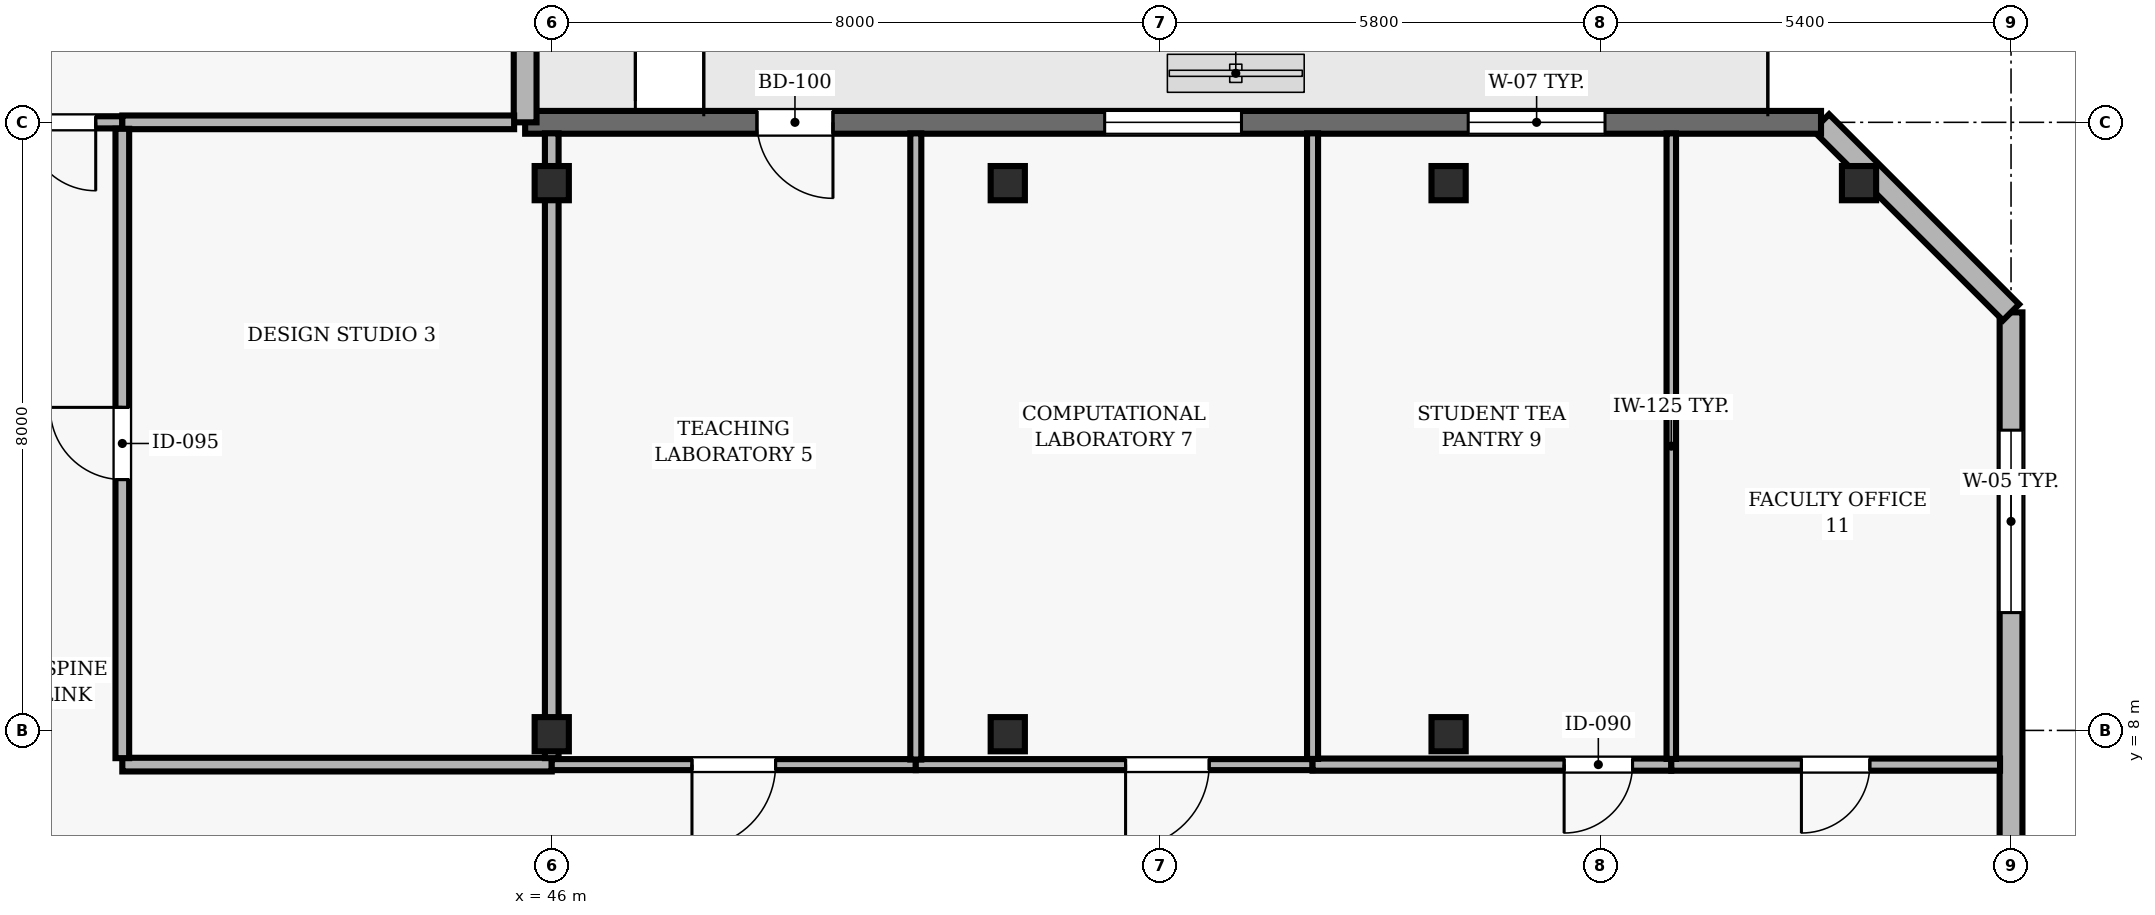
"""IFC4 building model, lengths in metres.
Left out: names, types, materials, properties, quantities, classifications, styles, units other than length and angle.
Written with IfcOpenShell. Run it as: python <this file> out.ifc"""

import sys

from ifc_helpers import new_model, si_unit, direction, frame, frame_2d, origin, origin_2d, place, context, subcontext, project, spatial, rectangle, hollow_rectangle, extrude, element, fill, save


model = new_model("IFC4")
c1 = context("Model", 3, precision=1e-05, world=origin(), true_north=direction((0.0, 1.0)))
c2 = subcontext(c1, "Body", "Model", "MODEL_VIEW")
j1 = project(units=[si_unit("LENGTHUNIT", "METRE"), si_unit("PLANEANGLEUNIT", "RADIAN")], contexts=[c1])
p1 = place(None, origin())
s1 = spatial("IfcSite", under=j1, at=p1, CompositionType="ELEMENT")
p2 = place(p1, origin())
s2 = spatial("IfcBuilding", under=s1, at=p2, CompositionType="ELEMENT")
p3 = place(p2, frame((0.0, 0.0, 207.0)))
s3 = spatial("IfcBuildingStorey", under=s2, at=p3, CompositionType="ELEMENT", Elevation=207.0)
for number, where, z_axis, x_axis in (
    (1, (46.0, 7.95, 0.0), (0.0, 0.0, 1.0), (1.0, 0.0, 0.0)),
    (2, (46.0, 15.2, 0.0), (0.0, 0.0, 1.0), (1.0, 0.0, 0.0)),
    (3, (52.0, 7.95, 0.0), (0.0, 0.0, 1.0), (1.0, 0.0, 0.0)),
    (4, (52.0, 15.2, 0.0), (0.0, 0.0, 1.0), (1.0, 0.0, 0.0)),
    (5, (57.8, 7.95, 0.0), (0.0, 0.0, 1.0), (1.0, 0.0, 0.0)),
    (6, (57.8, 15.2, 0.0), (0.0, 0.0, 1.0), (1.0, 0.0, 0.0)),
    (7, (63.2, 15.2, 0.0), (0.0, 0.0, 1.0), (1.0, 0.0, 0.0)),
):
    element("IfcColumn", number, at=place(p3, frame(where, z_axis=z_axis, x_axis=x_axis)), inside=s3, PredefinedType="COLUMN", context=c2, shape_type="SweptSolid", body=[
        extrude(hollow_rectangle(XDim=0.45, YDim=0.45, WallThickness=0.02, at=origin_2d()), origin(), (0.0, 0.0, 1.0), 3.9),
    ])
p4 = place(p3, frame((65.2, 2.5, 0.0), z_axis=(0.0, 0.0, 1.0), x_axis=(0.0, 1.0, 0.0)))
e8 = element("IfcWall", 8, at=p4, inside=s3, PredefinedType="SOLIDWALL", context=c2, shape_type="SweptSolid", body=[
    extrude(rectangle(XDim=11.0, YDim=0.3, at=frame_2d((5.5, 0.0))), origin(), (0.0, 0.0, 1.0), 3.69),
])
p5 = place(p4, frame((7.05, 0.0, 0.9)))
e9 = element("IfcOpeningElement", 9, at=p5, cuts=e8, PredefinedType="OPENING", context=c2, shape_type="SweptSolid", body=[
    extrude(rectangle(XDim=2.4, YDim=1.6, at=frame_2d((1.2, 0.8))), frame((0.0, 0.16, 0.0), z_axis=(0.0, -1.0, 0.0), x_axis=(1.0, 0.0, 0.0)), (0.0, 0.0, 1.0), 0.32),
])
p6 = place(p3, frame((65.2, 13.5, 0.0), z_axis=(0.0, 0.0, 1.0), x_axis=(-0.707106781187, 0.707106781187, 0.0)))
e10 = element("IfcWall", 10, at=p6, inside=s3, PredefinedType="SOLIDWALL", context=c2, shape_type="SweptSolid", body=[
    extrude(rectangle(XDim=3.536, YDim=0.3, at=frame_2d((1.768, 0.0))), origin(), (0.0, 0.0, 1.0), 3.69),
])
p7 = place(p3, frame((62.7, 16.0, 0.0), z_axis=(0.0, 0.0, 1.0), x_axis=(-1.0, 0.0, 0.0)))
e11 = element("IfcWall", 11, at=p7, inside=s3, PredefinedType="SOLIDWALL", context=c2, shape_type="SweptSolid", body=[
    extrude(rectangle(XDim=17.05, YDim=0.3, at=frame_2d((8.525, 0.0))), origin(), (0.0, 0.0, 1.0), 3.69),
])
p8 = place(p7, frame((13.0, 0.0, 0.0)))
e12 = element("IfcOpeningElement", 12, at=p8, cuts=e11, PredefinedType="OPENING", context=c2, shape_type="SweptSolid", body=[
    extrude(rectangle(XDim=1.0, YDim=2.2, at=frame_2d((0.5, 1.1))), frame((0.0, 0.16, 0.0), z_axis=(0.0, -1.0, 0.0), x_axis=(1.0, 0.0, 0.0)), (0.0, 0.0, 1.0), 0.32),
])
p9 = place(p7, frame((2.842, 0.0, 0.9)))
e13 = element("IfcOpeningElement", 13, at=p9, cuts=e11, PredefinedType="OPENING", context=c2, shape_type="SweptSolid", body=[
    extrude(rectangle(XDim=1.8, YDim=1.8, at=frame_2d((0.9, 0.9))), frame((0.0, 0.16, 0.0), z_axis=(0.0, -1.0, 0.0), x_axis=(1.0, 0.0, 0.0)), (0.0, 0.0, 1.0), 0.32),
])
p10 = place(p7, frame((7.625, 0.0, 0.9)))
e14 = element("IfcOpeningElement", 14, at=p10, cuts=e11, PredefinedType="OPENING", context=c2, shape_type="SweptSolid", body=[
    extrude(rectangle(XDim=1.8, YDim=1.8, at=frame_2d((0.9, 0.9))), frame((0.0, 0.16, 0.0), z_axis=(0.0, -1.0, 0.0), x_axis=(1.0, 0.0, 0.0)), (0.0, 0.0, 1.0), 0.32),
])
p11 = place(p3, frame((45.65, 16.0, 0.0), z_axis=(0.0, 0.0, 1.0), x_axis=(0.0, 1.0, 0.0)))
e15 = element("IfcWall", 15, at=p11, inside=s3, PredefinedType="SOLIDWALL", context=c2, shape_type="SweptSolid", body=[
    extrude(rectangle(XDim=5.483, YDim=0.3, at=frame_2d((2.741, 0.0))), origin(), (0.0, 0.0, 1.0), 3.69),
])
p12 = place(p11, frame((2.067, 0.0, 0.0)))
e16 = element("IfcOpeningElement", 16, at=p12, cuts=e15, PredefinedType="OPENING", context=c2, shape_type="SweptSolid", body=[
    extrude(rectangle(XDim=1.35, YDim=2.2, at=frame_2d((0.675, 1.1))), frame((0.0, 0.16, 0.0), z_axis=(0.0, -1.0, 0.0), x_axis=(1.0, 0.0, 0.0)), (0.0, 0.0, 1.0), 0.32),
])
p13 = place(p3, frame((40.35, 16.0, 0.0), z_axis=(0.0, 0.0, 1.0), x_axis=(-1.0, 0.0, 0.0)))
e17 = element("IfcWall", 17, at=p13, inside=s3, PredefinedType="PARTITIONING", context=c2, shape_type="SweptSolid", body=[
    extrude(rectangle(XDim=2.3, YDim=0.16, at=frame_2d((1.15, 0.0))), origin(), (0.0, 0.0, 1.0), 3.69),
])
p14 = place(p13, frame((0.35, 0.0, 0.0)))
e18 = element("IfcOpeningElement", 18, at=p14, cuts=e17, PredefinedType="OPENING", context=c2, shape_type="SweptSolid", body=[
    extrude(rectangle(XDim=0.9, YDim=2.1, at=frame_2d((0.45, 1.05))), frame((0.0, 0.09, 0.0), z_axis=(0.0, -1.0, 0.0), x_axis=(1.0, 0.0, 0.0)), (0.0, 0.0, 1.0), 0.18),
])
p15 = place(p3, frame((40.35, 16.0, 0.0), z_axis=(0.0, 0.0, 1.0), x_axis=(1.0, 0.0, 0.0)))
e19 = element("IfcWall", 19, at=p15, inside=s3, PredefinedType="PARTITIONING", context=c2, shape_type="SweptSolid", body=[
    extrude(rectangle(XDim=5.155, YDim=0.18, at=frame_2d((2.577, 0.0))), origin(), (0.0, 0.0, 1.0), 3.69),
])
p16 = place(p3, frame((46.0, 7.55, 0.0), z_axis=(0.0, 0.0, 1.0), x_axis=(-1.0, 0.0, 0.0)))
e20 = element("IfcWall", 20, at=p16, inside=s3, PredefinedType="PARTITIONING", context=c2, shape_type="SweptSolid", body=[
    extrude(rectangle(XDim=5.65, YDim=0.18, at=frame_2d((2.825, 0.0))), origin(), (0.0, 0.0, 1.0), 3.139),
])
p17 = place(p3, frame((50.79, 7.55, 0.0), z_axis=(0.0, 0.0, 1.0), x_axis=(-1.0, 0.0, 0.0)))
e21 = element("IfcWall", 21, at=p17, inside=s3, PredefinedType="PARTITIONING", context=c2, shape_type="SweptSolid", body=[
    extrude(rectangle(XDim=4.79, YDim=0.145, at=frame_2d((2.395, 0.0))), origin(), (0.0, 0.0, 1.0), 3.139),
])
p18 = place(p17, frame((1.845, 0.0, 0.0)))
e22 = element("IfcOpeningElement", 22, at=p18, cuts=e21, PredefinedType="OPENING", context=c2, shape_type="SweptSolid", body=[
    extrude(rectangle(XDim=1.1, YDim=2.15, at=frame_2d((0.55, 1.075))), frame((0.0, 0.083, 0.0), z_axis=(0.0, -1.0, 0.0), x_axis=(1.0, 0.0, 0.0)), (0.0, 0.0, 1.0), 0.165),
])
p19 = place(p3, frame((56.01, 7.55, 0.0), z_axis=(0.0, 0.0, 1.0), x_axis=(-1.0, 0.0, 0.0)))
e23 = element("IfcWall", 23, at=p19, inside=s3, PredefinedType="PARTITIONING", context=c2, shape_type="SweptSolid", body=[
    extrude(rectangle(XDim=5.22, YDim=0.145, at=frame_2d((2.61, 0.0))), origin(), (0.0, 0.0, 1.0), 3.139),
])
p20 = place(p19, frame((1.36, 0.0, 0.0)))
e24 = element("IfcOpeningElement", 24, at=p20, cuts=e23, PredefinedType="OPENING", context=c2, shape_type="SweptSolid", body=[
    extrude(rectangle(XDim=1.1, YDim=2.15, at=frame_2d((0.55, 1.075))), frame((0.0, 0.083, 0.0), z_axis=(0.0, -1.0, 0.0), x_axis=(1.0, 0.0, 0.0)), (0.0, 0.0, 1.0), 0.165),
])
p21 = place(p3, frame((60.73, 7.55, 0.0), z_axis=(0.0, 0.0, 1.0), x_axis=(-1.0, 0.0, 0.0)))
e25 = element("IfcWall", 25, at=p21, inside=s3, PredefinedType="PARTITIONING", context=c2, shape_type="SweptSolid", body=[
    extrude(rectangle(XDim=4.72, YDim=0.16, at=frame_2d((2.36, 0.0))), origin(), (0.0, 0.0, 1.0), 3.139),
])
p22 = place(p21, frame((0.51, 0.0, 0.0)))
e26 = element("IfcOpeningElement", 26, at=p22, cuts=e25, PredefinedType="OPENING", context=c2, shape_type="SweptSolid", body=[
    extrude(rectangle(XDim=0.9, YDim=2.1, at=frame_2d((0.45, 1.05))), frame((0.0, 0.09, 0.0), z_axis=(0.0, -1.0, 0.0), x_axis=(1.0, 0.0, 0.0)), (0.0, 0.0, 1.0), 0.18),
])
p23 = place(p3, frame((65.055, 7.55, 0.0), z_axis=(0.0, 0.0, 1.0), x_axis=(-1.0, 0.0, 0.0)))
e27 = element("IfcWall", 27, at=p23, inside=s3, PredefinedType="PARTITIONING", context=c2, shape_type="SweptSolid", body=[
    extrude(rectangle(XDim=4.325, YDim=0.16, at=frame_2d((2.163, 0.0))), origin(), (0.0, 0.0, 1.0), 3.69),
])
p24 = place(p23, frame((1.713, 0.0, 0.0)))
e28 = element("IfcOpeningElement", 28, at=p24, cuts=e27, PredefinedType="OPENING", context=c2, shape_type="SweptSolid", body=[
    extrude(rectangle(XDim=0.9, YDim=2.1, at=frame_2d((0.45, 1.05))), frame((0.0, 0.09, 0.0), z_axis=(0.0, -1.0, 0.0), x_axis=(1.0, 0.0, 0.0)), (0.0, 0.0, 1.0), 0.18),
])
p25 = place(p3, frame((40.35, 7.635, 0.0), z_axis=(0.0, 0.0, 1.0), x_axis=(0.0, 1.0, 0.0)))
e29 = element("IfcWall", 29, at=p25, inside=s3, PredefinedType="PARTITIONING", context=c2, shape_type="SweptSolid", body=[
    extrude(rectangle(XDim=8.28, YDim=0.18, at=frame_2d((4.14, 0.0))), origin(), (0.0, 0.0, 1.0), 3.343),
])
p26 = place(p25, frame((3.665, 0.0, 0.0)))
e30 = element("IfcOpeningElement", 30, at=p26, cuts=e29, PredefinedType="OPENING", context=c2, shape_type="SweptSolid", body=[
    extrude(rectangle(XDim=0.95, YDim=2.1, at=frame_2d((0.475, 1.05))), frame((0.0, 0.1, 0.0), z_axis=(0.0, -1.0, 0.0), x_axis=(1.0, 0.0, 0.0)), (0.0, 0.0, 1.0), 0.2),
])
p27 = place(p3, frame((46.0, 7.635, 0.0), z_axis=(0.0, 0.0, 1.0), x_axis=(0.0, 1.0, 0.0)))
e31 = element("IfcWall", 31, at=p27, inside=s3, PredefinedType="PARTITIONING", context=c2, shape_type="SweptSolid", body=[
    extrude(rectangle(XDim=8.22, YDim=0.18, at=frame_2d((4.11, 0.0))), origin(), (0.0, 0.0, 1.0), 3.139),
])
p28 = place(p3, frame((50.79, 7.617, 0.0), z_axis=(0.0, 0.0, 1.0), x_axis=(0.0, 1.0, 0.0)))
e32 = element("IfcWall", 32, at=p28, inside=s3, PredefinedType="PARTITIONING", context=c2, shape_type="SweptSolid", body=[
    extrude(rectangle(XDim=8.238, YDim=0.145, at=frame_2d((4.119, 0.0))), origin(), (0.0, 0.0, 1.0), 3.69),
])
p29 = place(p3, frame((56.01, 7.625, 0.0), z_axis=(0.0, 0.0, 1.0), x_axis=(0.0, 1.0, 0.0)))
e33 = element("IfcWall", 33, at=p29, inside=s3, PredefinedType="PARTITIONING", context=c2, shape_type="SweptSolid", body=[
    extrude(rectangle(XDim=8.23, YDim=0.145, at=frame_2d((4.115, 0.0))), origin(), (0.0, 0.0, 1.0), 3.69),
])
p30 = place(p3, frame((60.73, 7.625, 0.0), z_axis=(0.0, 0.0, 1.0), x_axis=(0.0, 1.0, 0.0)))
e34 = element("IfcWall", 34, at=p30, inside=s3, PredefinedType="PARTITIONING", context=c2, shape_type="SweptSolid", body=[
    extrude(rectangle(XDim=8.23, YDim=0.125, at=frame_2d((4.115, 0.0))), origin(), (0.0, 0.0, 1.0), 3.69),
])
p31 = place(p5, origin())
e35 = element("IfcWindow", 35, at=p31, inside=s3, PartitioningType="SINGLE_PANEL", PredefinedType="WINDOW", context=c2, shape_type="SweptSolid", body=[
    extrude(rectangle(XDim=2.4, YDim=1.6, at=frame_2d((1.2, 0.8))), frame((0.0, 0.03, 0.0), z_axis=(0.0, -1.0, 0.0), x_axis=(1.0, 0.0, 0.0)), (0.0, 0.0, 1.0), 0.06),
])
fill(e9, e35)
p32 = place(p8, origin())
e36 = element("IfcDoor", 36, at=p32, inside=s3, OperationType="SINGLE_SWING_LEFT", PredefinedType="DOOR", context=c2, shape_type="SweptSolid", body=[
    extrude(rectangle(XDim=1.0, YDim=2.2, at=frame_2d((0.5, 1.1))), frame((0.0, 0.025, 0.0), z_axis=(0.0, -1.0, 0.0), x_axis=(1.0, 0.0, 0.0)), (0.0, 0.0, 1.0), 0.05),
])
fill(e12, e36)
p33 = place(p9, origin())
e37 = element("IfcWindow", 37, at=p33, inside=s3, PartitioningType="SINGLE_PANEL", PredefinedType="WINDOW", context=c2, shape_type="SweptSolid", body=[
    extrude(rectangle(XDim=1.8, YDim=1.8, at=frame_2d((0.9, 0.9))), frame((0.0, 0.03, 0.0), z_axis=(0.0, -1.0, 0.0), x_axis=(1.0, 0.0, 0.0)), (0.0, 0.0, 1.0), 0.06),
])
fill(e13, e37)
p34 = place(p10, origin())
e38 = element("IfcWindow", 38, at=p34, inside=s3, PartitioningType="SINGLE_PANEL", PredefinedType="WINDOW", context=c2, shape_type="SweptSolid", body=[
    extrude(rectangle(XDim=1.8, YDim=1.8, at=frame_2d((0.9, 0.9))), frame((0.0, 0.03, 0.0), z_axis=(0.0, -1.0, 0.0), x_axis=(1.0, 0.0, 0.0)), (0.0, 0.0, 1.0), 0.06),
])
fill(e14, e38)
p35 = place(p26, origin())
e39 = element("IfcDoor", 39, at=p35, inside=s3, OperationType="SINGLE_SWING_RIGHT", PredefinedType="DOOR", context=c2, shape_type="SweptSolid", body=[
    extrude(rectangle(XDim=0.95, YDim=2.1, at=frame_2d((0.475, 1.05))), frame((0.0, 0.025, 0.0), z_axis=(0.0, -1.0, 0.0), x_axis=(1.0, 0.0, 0.0)), (0.0, 0.0, 1.0), 0.05),
])
fill(e30, e39)
p36 = place(p18, origin())
e40 = element("IfcDoor", 40, at=p36, inside=s3, OperationType="SINGLE_SWING_RIGHT", PredefinedType="DOOR", context=c2, shape_type="SweptSolid", body=[
    extrude(rectangle(XDim=1.1, YDim=2.15, at=frame_2d((0.55, 1.075))), frame((0.0, 0.025, 0.0), z_axis=(0.0, -1.0, 0.0), x_axis=(1.0, 0.0, 0.0)), (0.0, 0.0, 1.0), 0.05),
])
fill(e22, e40)
p37 = place(p20, origin())
e41 = element("IfcDoor", 41, at=p37, inside=s3, OperationType="SINGLE_SWING_RIGHT", PredefinedType="DOOR", context=c2, shape_type="SweptSolid", body=[
    extrude(rectangle(XDim=1.1, YDim=2.15, at=frame_2d((0.55, 1.075))), frame((0.0, 0.025, 0.0), z_axis=(0.0, -1.0, 0.0), x_axis=(1.0, 0.0, 0.0)), (0.0, 0.0, 1.0), 0.05),
])
fill(e24, e41)
p38 = place(p22, origin())
e42 = element("IfcDoor", 42, at=p38, inside=s3, OperationType="SINGLE_SWING_RIGHT", PredefinedType="DOOR", context=c2, shape_type="SweptSolid", body=[
    extrude(rectangle(XDim=0.9, YDim=2.1, at=frame_2d((0.45, 1.05))), frame((0.0, 0.025, 0.0), z_axis=(0.0, -1.0, 0.0), x_axis=(1.0, 0.0, 0.0)), (0.0, 0.0, 1.0), 0.05),
])
fill(e26, e42)
p39 = place(p24, origin())
e43 = element("IfcDoor", 43, at=p39, inside=s3, OperationType="SINGLE_SWING_RIGHT", PredefinedType="DOOR", context=c2, shape_type="SweptSolid", body=[
    extrude(rectangle(XDim=0.9, YDim=2.1, at=frame_2d((0.45, 1.05))), frame((0.0, 0.025, 0.0), z_axis=(0.0, -1.0, 0.0), x_axis=(1.0, 0.0, 0.0)), (0.0, 0.0, 1.0), 0.05),
])
fill(e28, e43)
p40 = place(p14, origin())
e44 = element("IfcDoor", 44, at=p40, inside=s3, OperationType="SINGLE_SWING_LEFT", PredefinedType="DOOR", context=c2, shape_type="SweptSolid", body=[
    extrude(rectangle(XDim=0.9, YDim=2.1, at=frame_2d((0.45, 1.05))), frame((0.0, 0.025, 0.0), z_axis=(0.0, -1.0, 0.0), x_axis=(1.0, 0.0, 0.0)), (0.0, 0.0, 1.0), 0.05),
])
fill(e18, e44)
save(model, sys.argv[1])
